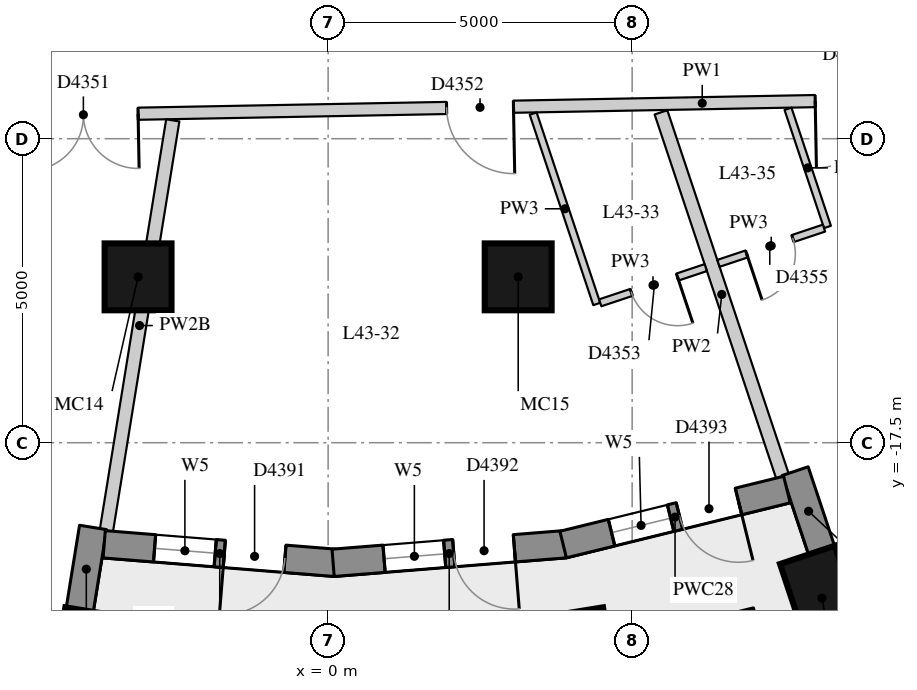
"""IFC4 building model, lengths in metres.
Left out: names, types, materials, properties, quantities, classifications, styles, units other than length and angle.
Written with IfcOpenShell. Run it as: python <this file> out.ifc"""

import sys

from ifc_helpers import new_model, si_unit, direction, frame, frame_2d, origin, origin_2d, place, context, subcontext, project, spatial, rectangle, extrude, element, fill, save


model = new_model("IFC4")
c1 = context("Model", 3, precision=1e-05, world=origin(), true_north=direction((0.0, 1.0)))
c2 = subcontext(c1, "Body", "Model", "MODEL_VIEW")
j1 = project(units=[si_unit("LENGTHUNIT", "METRE"), si_unit("PLANEANGLEUNIT", "RADIAN")], contexts=[c1])
p1 = place(None, origin())
s1 = spatial("IfcSite", under=j1, at=p1, CompositionType="ELEMENT")
p2 = place(p1, origin())
s2 = spatial("IfcBuilding", under=s1, at=p2, CompositionType="ELEMENT")
p3 = place(p2, frame((0.0, 0.0, 155.0)))
s3 = spatial("IfcBuildingStorey", under=s2, at=p3, CompositionType="ELEMENT", Elevation=155.0)
for number, where, z_axis, x_axis in (
    (1, (-3.972, -21.024, 0.0), (0.0, 0.0, 1.0), (-0.16, -0.987, 0.0)),
    (2, (4.172, -21.024, 0.0), (0.0, 0.0, 1.0), (0.16, -0.987, 0.0)),
    (3, (8.12, -20.056, 0.0), (0.0, 0.0, 1.0), (0.317, -0.949, 0.0)),
):
    element("IfcColumn", number, at=place(p3, frame(where, z_axis=z_axis, x_axis=x_axis)), inside=s3, PredefinedType="COLUMN", context=c2, shape_type="SweptSolid", body=[
        extrude(rectangle(XDim=1.5, YDim=0.95, at=origin_2d()), origin(), (0.0, 0.0, 1.0), 3.3),
    ])
for number, where, z_axis, x_axis in (
    (4, (-3.126, -14.772, 0.0), (0.0, 0.0, 1.0), (1.0, 0.0, 0.0)),
    (5, (3.126, -14.772, 0.0), (0.0, 0.0, 1.0), (1.0, 0.0, 0.0)),
):
    element("IfcColumn", number, at=place(p3, frame(where, z_axis=z_axis, x_axis=x_axis)), inside=s3, PredefinedType="COLUMN", context=c2, shape_type="SweptSolid", body=[
        extrude(rectangle(XDim=1.1, YDim=1.1, at=origin_2d()), origin(), (0.0, 0.0, 1.0), 3.3),
    ])
p4 = place(p3, frame((-4.088, -20.266, 0.0), z_axis=(0.0, 0.0, 1.0), x_axis=(0.159641024018, 0.98717513312, 0.0)))
e6 = element("IfcWall", 6, at=p4, inside=s3, PredefinedType="SOLIDWALL", context=c2, shape_type="SweptSolid", body=[
    extrude(rectangle(XDim=1.39, YDim=0.45, at=frame_2d((0.695, 0.0))), origin(), (0.0, 0.0, 1.0), 2.57),
])
p5 = place(p3, frame((8.122, -19.286, 0.0), z_axis=(0.0, 0.0, 1.0), x_axis=(-0.316649231286, 0.948542705589, 0.0)))
e7 = element("IfcWall", 7, at=p5, inside=s3, PredefinedType="SOLIDWALL", context=c2, shape_type="SweptSolid", body=[
    extrude(rectangle(XDim=1.39, YDim=0.45, at=frame_2d((0.695, 0.0))), origin(), (0.0, 0.0, 1.0), 3.02),
])
p6 = place(p3, frame((-3.683, -19.171, 0.0), z_axis=(0.0, 0.0, 1.0), x_axis=(0.996792437449, -0.080030223316, 0.0)))
e8 = element("IfcWall", 8, at=p6, inside=s3, PredefinedType="SOLIDWALL", context=c2, shape_type="SweptSolid", body=[
    extrude(rectangle(XDim=3.813, YDim=0.45, at=frame_2d((1.907, 0.0))), origin(), (0.0, 0.0, 1.0), 3.02),
])
p7 = place(p6, frame((0.832, 0.0, 0.4)))
e9 = element("IfcOpeningElement", 9, at=p7, cuts=e8, PredefinedType="OPENING", context=c2, shape_type="SweptSolid", body=[
    extrude(rectangle(XDim=1.0, YDim=1.75, at=frame_2d((0.5, 0.875))), frame((0.0, 0.235, 0.0), z_axis=(0.0, -1.0, 0.0), x_axis=(1.0, 0.0, 0.0)), (0.0, 0.0, 1.0), 0.47),
])
p8 = place(p6, frame((1.982, 0.0, 0.0)))
e10 = element("IfcOpeningElement", 10, at=p8, cuts=e8, PredefinedType="OPENING", context=c2, shape_type="SweptSolid", body=[
    extrude(rectangle(XDim=1.0, YDim=2.15, at=frame_2d((0.5, 1.075))), frame((0.0, 0.235, 0.0), z_axis=(0.0, -1.0, 0.0), x_axis=(1.0, 0.0, 0.0)), (0.0, 0.0, 1.0), 0.47),
])
p9 = place(p3, frame((0.082, -19.476, 0.0), z_axis=(0.0, 0.0, 1.0), x_axis=(0.996792139022, 0.080033940204, 0.0)))
e11 = element("IfcWall", 11, at=p9, inside=s3, PredefinedType="SOLIDWALL", context=c2, shape_type="SweptSolid", body=[
    extrude(rectangle(XDim=3.831, YDim=0.45, at=frame_2d((1.916, 0.0))), origin(), (0.0, 0.0, 1.0), 3.02),
])
p10 = place(p9, frame((0.841, 0.0, 0.4)))
e12 = element("IfcOpeningElement", 12, at=p10, cuts=e11, PredefinedType="OPENING", context=c2, shape_type="SweptSolid", body=[
    extrude(rectangle(XDim=1.0, YDim=1.75, at=frame_2d((0.5, 0.875))), frame((0.0, 0.235, 0.0), z_axis=(0.0, -1.0, 0.0), x_axis=(1.0, 0.0, 0.0)), (0.0, 0.0, 1.0), 0.47),
])
p11 = place(p9, frame((1.991, 0.0, 0.0)))
e13 = element("IfcOpeningElement", 13, at=p11, cuts=e11, PredefinedType="OPENING", context=c2, shape_type="SweptSolid", body=[
    extrude(rectangle(XDim=1.0, YDim=2.15, at=frame_2d((0.5, 1.075))), frame((0.0, 0.235, 0.0), z_axis=(0.0, -1.0, 0.0), x_axis=(1.0, 0.0, 0.0)), (0.0, 0.0, 1.0), 0.47),
])
p12 = place(p3, frame((3.865, -19.175, 0.0), z_axis=(0.0, 0.0, 1.0), x_axis=(0.97109740077, 0.238683552465, 0.0)))
e14 = element("IfcWall", 14, at=p12, inside=s3, PredefinedType="SOLIDWALL", context=c2, shape_type="SweptSolid", body=[
    extrude(rectangle(XDim=3.79, YDim=0.45, at=frame_2d((1.895, 0.0))), origin(), (0.0, 0.0, 1.0), 3.02),
])
p13 = place(p12, frame((0.82, 0.0, 0.4)))
e15 = element("IfcOpeningElement", 15, at=p13, cuts=e14, PredefinedType="OPENING", context=c2, shape_type="SweptSolid", body=[
    extrude(rectangle(XDim=1.0, YDim=1.75, at=frame_2d((0.5, 0.875))), frame((0.0, 0.235, 0.0), z_axis=(0.0, -1.0, 0.0), x_axis=(1.0, 0.0, 0.0)), (0.0, 0.0, 1.0), 0.47),
])
p14 = place(p12, frame((1.97, 0.0, 0.0)))
e16 = element("IfcOpeningElement", 16, at=p14, cuts=e14, PredefinedType="OPENING", context=c2, shape_type="SweptSolid", body=[
    extrude(rectangle(XDim=1.0, YDim=2.15, at=frame_2d((0.5, 1.075))), frame((0.0, 0.235, 0.0), z_axis=(0.0, -1.0, 0.0), x_axis=(1.0, 0.0, 0.0)), (0.0, 0.0, 1.0), 0.47),
])
p15 = place(p3, frame((5.329, -20.985, 0.0), z_axis=(0.0, 0.0, 1.0), x_axis=(0.971249321581, 0.238064603265, 0.0)))
e17 = element("IfcWall", 17, at=p15, inside=s3, PredefinedType="USERDEFINED", context=c2, shape_type="SweptSolid", body=[
    extrude(rectangle(XDim=1.8, YDim=0.7, at=frame_2d((0.9, 0.0))), origin(), (0.0, 0.0, 1.0), 0.75),
])
p16 = place(p3, frame((17.6, -11.702, 0.0), z_axis=(0.0, 0.0, 1.0), x_axis=(-0.999825923551, -0.018658043723, 0.0)))
e18 = element("IfcWall", 18, at=p16, inside=s3, PredefinedType="PARTITIONING", context=c2, shape_type="SweptSolid", body=[
    extrude(rectangle(XDim=22.899, YDim=0.2, at=frame_2d((11.449, 0.0))), origin(), (0.0, 0.0, 1.0), 3.02),
])
p17 = place(p16, frame((20.729, 0.0, 0.0)))
e19 = element("IfcOpeningElement", 19, at=p17, cuts=e18, PredefinedType="OPENING", context=c2, shape_type="SweptSolid", body=[
    extrude(rectangle(XDim=1.8, YDim=2.1, at=frame_2d((0.9, 1.05))), frame((0.0, 0.11, 0.0), z_axis=(0.0, -1.0, 0.0), x_axis=(1.0, 0.0, 0.0)), (0.0, 0.0, 1.0), 0.22),
])
p18 = place(p16, frame((14.554, 0.0, 0.0)))
e20 = element("IfcOpeningElement", 20, at=p18, cuts=e18, PredefinedType="OPENING", context=c2, shape_type="SweptSolid", body=[
    extrude(rectangle(XDim=1.1, YDim=2.1, at=frame_2d((0.55, 1.05))), frame((0.0, 0.11, 0.0), z_axis=(0.0, -1.0, 0.0), x_axis=(1.0, 0.0, 0.0)), (0.0, 0.0, 1.0), 0.22),
])
p19 = place(p16, frame((8.491, 0.0, 0.0)))
e21 = element("IfcOpeningElement", 21, at=p19, cuts=e18, PredefinedType="OPENING", context=c2, shape_type="SweptSolid", body=[
    extrude(rectangle(XDim=1.1, YDim=2.1, at=frame_2d((0.55, 1.05))), frame((0.0, 0.11, 0.0), z_axis=(0.0, -1.0, 0.0), x_axis=(1.0, 0.0, 0.0)), (0.0, 0.0, 1.0), 0.22),
])
p20 = place(p3, frame((-3.647, -18.948, 0.0), z_axis=(0.0, 0.0, 1.0), x_axis=(0.159718523375, 0.98716259719, 0.0)))
e22 = element("IfcWall", 22, at=p20, inside=s3, PredefinedType="PARTITIONING", context=c2, shape_type="SweptSolid", body=[
    extrude(rectangle(XDim=6.837, YDim=0.22, at=frame_2d((3.419, 0.0))), origin(), (0.0, 0.0, 1.0), 2.57),
])
p21 = place(p3, frame((7.474, -18.056, 0.0), z_axis=(0.0, 0.0, 1.0), x_axis=(-0.316714858998, 0.948520794759, 0.0)))
e23 = element("IfcWall", 23, at=p21, inside=s3, PredefinedType="PARTITIONING", context=c2, shape_type="SweptSolid", body=[
    extrude(rectangle(XDim=6.315, YDim=0.22, at=frame_2d((3.157, 0.0))), origin(), (0.0, 0.0, 1.0), 3.02),
])
p22 = place(p3, frame((3.372, -12.087, 0.0), z_axis=(0.0, 0.0, 1.0), x_axis=(0.316715775564, -0.948520488713, 0.0)))
e24 = element("IfcWall", 24, at=p22, inside=s3, PredefinedType="PARTITIONING", context=c2, shape_type="SweptSolid", body=[
    extrude(rectangle(XDim=3.302, YDim=0.12, at=frame_2d((1.651, 0.0))), origin(), (0.0, 0.0, 1.0), 3.02),
])
p23 = place(p3, frame((7.563, -12.009, 0.0), z_axis=(0.0, 0.0, 1.0), x_axis=(0.316763997654, -0.948504385752, 0.0)))
e25 = element("IfcWall", 25, at=p23, inside=s3, PredefinedType="PARTITIONING", context=c2, shape_type="SweptSolid", body=[
    extrude(rectangle(XDim=2.049, YDim=0.12, at=frame_2d((1.024, 0.0))), origin(), (0.0, 0.0, 1.0), 3.02),
])
p24 = place(p3, frame((4.475, -15.199, 0.0), z_axis=(0.0, 0.0, 1.0), x_axis=(0.948549784176, 0.316628026143, 0.0)))
e26 = element("IfcWall", 26, at=p24, inside=s3, PredefinedType="PARTITIONING", context=c2, shape_type="SweptSolid", body=[
    extrude(rectangle(XDim=1.83, YDim=0.12, at=frame_2d((0.915, 0.0))), origin(), (0.0, 0.0, 1.0), 3.02),
])
p25 = place(p24, frame((0.54, 0.0, 0.0)))
e27 = element("IfcOpeningElement", 27, at=p25, cuts=e26, PredefinedType="OPENING", context=c2, shape_type="SweptSolid", body=[
    extrude(rectangle(XDim=0.8, YDim=2.1, at=frame_2d((0.4, 1.05))), frame((0.0, 0.07, 0.0), z_axis=(0.0, -1.0, 0.0), x_axis=(1.0, 0.0, 0.0)), (0.0, 0.0, 1.0), 0.14),
])
p26 = place(p3, frame((8.155, -13.971, 0.0), z_axis=(0.0, 0.0, 1.0), x_axis=(-0.9485230882, -0.31670799035, 0.0)))
e28 = element("IfcWall", 28, at=p26, inside=s3, PredefinedType="PARTITIONING", context=c2, shape_type="SweptSolid", body=[
    extrude(rectangle(XDim=1.83, YDim=0.12, at=frame_2d((0.915, 0.0))), origin(), (0.0, 0.0, 1.0), 3.02),
])
p27 = place(p26, frame((0.54, 0.0, 0.0)))
e29 = element("IfcOpeningElement", 29, at=p27, cuts=e28, PredefinedType="OPENING", context=c2, shape_type="SweptSolid", body=[
    extrude(rectangle(XDim=0.8, YDim=2.1, at=frame_2d((0.4, 1.05))), frame((0.0, 0.07, 0.0), z_axis=(0.0, -1.0, 0.0), x_axis=(1.0, 0.0, 0.0)), (0.0, 0.0, 1.0), 0.14),
])
p28 = place(p7, origin())
e30 = element("IfcWindow", 30, at=p28, inside=s3, PartitioningType="SINGLE_PANEL", PredefinedType="WINDOW", context=c2, shape_type="SweptSolid", body=[
    extrude(rectangle(XDim=1.0, YDim=1.75, at=frame_2d((0.5, 0.875))), frame((0.0, 0.035, 0.0), z_axis=(0.0, -1.0, 0.0), x_axis=(1.0, 0.0, 0.0)), (0.0, 0.0, 1.0), 0.06),
])
fill(e9, e30)
p29 = place(p8, frame((1.0, 0.0, 0.0), z_axis=(0.0, 0.0, 1.0), x_axis=(-1.0, 0.0, 0.0)))
e31 = element("IfcDoor", 31, at=p29, inside=s3, OperationType="SINGLE_SWING_RIGHT", PredefinedType="DOOR", context=c2, shape_type="SweptSolid", body=[
    extrude(rectangle(XDim=1.0, YDim=2.15, at=frame_2d((0.5, 1.075))), frame((0.0, 0.075, 0.0), z_axis=(0.0, -1.0, 0.0), x_axis=(1.0, 0.0, 0.0)), (0.0, 0.0, 1.0), 0.05),
])
fill(e10, e31)
p30 = place(p10, origin())
e32 = element("IfcWindow", 32, at=p30, inside=s3, PartitioningType="SINGLE_PANEL", PredefinedType="WINDOW", context=c2, shape_type="SweptSolid", body=[
    extrude(rectangle(XDim=1.0, YDim=1.75, at=frame_2d((0.5, 0.875))), frame((0.0, 0.035, 0.0), z_axis=(0.0, -1.0, 0.0), x_axis=(1.0, 0.0, 0.0)), (0.0, 0.0, 1.0), 0.06),
])
fill(e12, e32)
p31 = place(p11, frame((1.0, 0.0, 0.0), z_axis=(0.0, 0.0, 1.0), x_axis=(-1.0, 0.0, 0.0)))
e33 = element("IfcDoor", 33, at=p31, inside=s3, OperationType="SINGLE_SWING_LEFT", PredefinedType="DOOR", context=c2, shape_type="SweptSolid", body=[
    extrude(rectangle(XDim=1.0, YDim=2.15, at=frame_2d((0.5, 1.075))), frame((0.0, 0.075, 0.0), z_axis=(0.0, -1.0, 0.0), x_axis=(1.0, 0.0, 0.0)), (0.0, 0.0, 1.0), 0.05),
])
fill(e13, e33)
p32 = place(p13, origin())
e34 = element("IfcWindow", 34, at=p32, inside=s3, PartitioningType="SINGLE_PANEL", PredefinedType="WINDOW", context=c2, shape_type="SweptSolid", body=[
    extrude(rectangle(XDim=1.0, YDim=1.75, at=frame_2d((0.5, 0.875))), frame((0.0, 0.035, 0.0), z_axis=(0.0, -1.0, 0.0), x_axis=(1.0, 0.0, 0.0)), (0.0, 0.0, 1.0), 0.06),
])
fill(e15, e34)
p33 = place(p14, frame((1.0, 0.0, 0.0), z_axis=(0.0, 0.0, 1.0), x_axis=(-1.0, 0.0, 0.0)))
e35 = element("IfcDoor", 35, at=p33, inside=s3, OperationType="SINGLE_SWING_LEFT", PredefinedType="DOOR", context=c2, shape_type="SweptSolid", body=[
    extrude(rectangle(XDim=1.0, YDim=2.15, at=frame_2d((0.5, 1.075))), frame((0.0, 0.075, 0.0), z_axis=(0.0, -1.0, 0.0), x_axis=(1.0, 0.0, 0.0)), (0.0, 0.0, 1.0), 0.05),
])
fill(e16, e35)
p34 = place(p17, origin())
e36 = element("IfcDoor", 36, at=p34, inside=s3, OperationType="DOUBLE_DOOR_SINGLE_SWING", PredefinedType="DOOR", context=c2, shape_type="SweptSolid", body=[
    extrude(rectangle(XDim=1.8, YDim=2.1, at=frame_2d((0.9, 1.05))), frame((0.0, 0.025, 0.0), z_axis=(0.0, -1.0, 0.0), x_axis=(1.0, 0.0, 0.0)), (0.0, 0.0, 1.0), 0.05),
])
fill(e19, e36)
p35 = place(p18, origin())
e37 = element("IfcDoor", 37, at=p35, inside=s3, OperationType="SINGLE_SWING_LEFT", PredefinedType="DOOR", context=c2, shape_type="SweptSolid", body=[
    extrude(rectangle(XDim=1.1, YDim=2.1, at=frame_2d((0.55, 1.05))), frame((0.0, 0.025, 0.0), z_axis=(0.0, -1.0, 0.0), x_axis=(1.0, 0.0, 0.0)), (0.0, 0.0, 1.0), 0.05),
])
fill(e20, e37)
p36 = place(p25, origin())
e38 = element("IfcDoor", 38, at=p36, inside=s3, OperationType="SINGLE_SWING_LEFT", PredefinedType="DOOR", context=c2, shape_type="SweptSolid", body=[
    extrude(rectangle(XDim=0.8, YDim=2.1, at=frame_2d((0.4, 1.05))), frame((0.0, 0.025, 0.0), z_axis=(0.0, -1.0, 0.0), x_axis=(1.0, 0.0, 0.0)), (0.0, 0.0, 1.0), 0.05),
])
fill(e27, e38)
p37 = place(p19, origin())
e39 = element("IfcDoor", 39, at=p37, inside=s3, OperationType="SINGLE_SWING_RIGHT", PredefinedType="DOOR", context=c2, shape_type="SweptSolid", body=[
    extrude(rectangle(XDim=1.1, YDim=2.1, at=frame_2d((0.55, 1.05))), frame((0.0, 0.025, 0.0), z_axis=(0.0, -1.0, 0.0), x_axis=(1.0, 0.0, 0.0)), (0.0, 0.0, 1.0), 0.05),
])
fill(e21, e39)
p38 = place(p27, origin())
e40 = element("IfcDoor", 40, at=p38, inside=s3, OperationType="SINGLE_SWING_RIGHT", PredefinedType="DOOR", context=c2, shape_type="SweptSolid", body=[
    extrude(rectangle(XDim=0.8, YDim=2.1, at=frame_2d((0.4, 1.05))), frame((0.0, 0.025, 0.0), z_axis=(0.0, -1.0, 0.0), x_axis=(1.0, 0.0, 0.0)), (0.0, 0.0, 1.0), 0.05),
])
fill(e29, e40)
save(model, sys.argv[1])
